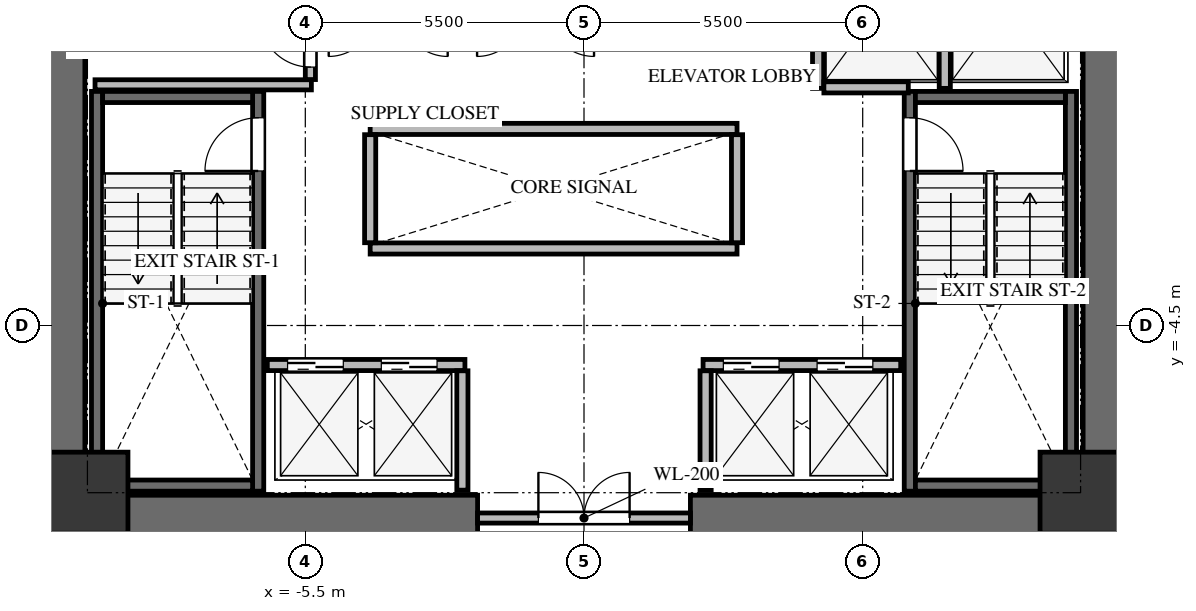
"""IFC4 building model, lengths in metres.
Left out: names, types, materials, properties, quantities, classifications, styles, units other than length and angle.
Written with IfcOpenShell. Run it as: python <this file> out.ifc"""

import sys

from ifc_helpers import new_model, si_unit, direction, frame, frame_2d, origin, origin_2d, place, context, subcontext, project, spatial, rectangle, extrude, source, transform, mapped, element, fill, save


model = new_model("IFC4")
c1 = context("Model", 3, precision=1e-05, world=origin(), true_north=direction((0.0, 1.0)))
c2 = subcontext(c1, "Body", "Model", "MODEL_VIEW")
j1 = project(units=[si_unit("LENGTHUNIT", "METRE"), si_unit("PLANEANGLEUNIT", "RADIAN")], contexts=[c1])
p1 = place(None, origin())
s1 = spatial("IfcSite", under=j1, at=p1, CompositionType="ELEMENT")
p2 = place(p1, origin())
s2 = spatial("IfcBuilding", under=s1, at=p2, CompositionType="ELEMENT")
p3 = place(p2, frame((0.0, 0.0, 68.7)))
s3 = spatial("IfcBuildingStorey", under=s2, at=p3, CompositionType="ELEMENT", Elevation=68.7)
for number, where, z_axis, x_axis in (
    (1, (-10.3, -8.75, 0.0), (0.0, 0.0, 1.0), (0.0, 1.0, 0.0)),
    (2, (10.3, -8.75, 0.0), (0.0, 0.0, 1.0), (0.0, 1.0, 0.0)),
):
    element("IfcWall", number, at=place(p3, frame(where, z_axis=z_axis, x_axis=x_axis)), inside=s3, PredefinedType="SHEAR", context=c2, shape_type="SweptSolid", body=[
        extrude(rectangle(XDim=17.5, YDim=0.9, at=frame_2d((8.75, 0.0))), origin(), (0.0, 0.0, 1.0), 3.3),
    ])
for number, where, z_axis, x_axis in (
    (3, (-9.85, -8.3, 0.0), (0.0, 0.0, 1.0), (1.0, 0.0, 0.0)),
    (4, (2.1, -8.3, 0.0), (0.0, 0.0, 1.0), (1.0, 0.0, 0.0)),
):
    element("IfcWall", number, at=place(p3, frame(where, z_axis=z_axis, x_axis=x_axis)), inside=s3, PredefinedType="SHEAR", context=c2, shape_type="SweptSolid", body=[
        extrude(rectangle(XDim=7.75, YDim=0.9, at=frame_2d((3.875, 0.0))), origin(), (0.0, 0.0, 1.0), 3.3),
    ])
p4 = place(p3, frame((-6.43, -7.77, -0.24), z_axis=(0.0, 0.0, 1.0), x_axis=(0.0, 1.0, 0.0)))
e5 = element("IfcWall", 5, at=p4, inside=s3, PredefinedType="SHEAR", context=c2, shape_type="SweptSolid", body=[
    extrude(rectangle(XDim=7.89, YDim=0.22, at=frame_2d((3.945, 0.0))), origin(), (0.0, 0.0, 1.0), 3.3),
])
p5 = place(p4, frame((6.32, 0.0, 0.0)))
e6 = element("IfcOpeningElement", 6, at=p5, cuts=e5, PredefinedType="OPENING", context=c2, shape_type="SweptSolid", body=[
    extrude(rectangle(XDim=1.05, YDim=2.15, at=frame_2d((0.525, 1.075))), frame((0.0, 0.12, 0.0), z_axis=(0.0, -1.0, 0.0), x_axis=(1.0, 0.0, 0.0)), (0.0, 0.0, 1.0), 0.24),
])
p6 = place(p3, frame((-9.61, 0.12, -0.24), z_axis=(0.0, 0.0, 1.0), x_axis=(0.0, -1.0, 0.0)))
e7 = element("IfcWall", 7, at=p6, inside=s3, PredefinedType="SHEAR", context=c2, shape_type="SweptSolid", body=[
    extrude(rectangle(XDim=7.89, YDim=0.22, at=frame_2d((3.945, 0.0))), origin(), (0.0, 0.0, 1.0), 3.3),
])
for number, where, z_axis, x_axis in (
    (8, (-9.5, -7.66, -0.24), (0.0, 0.0, 1.0), (1.0, 0.0, 0.0)),
    (9, (-6.54, 0.01, -0.24), (0.0, 0.0, 1.0), (-1.0, 0.0, 0.0)),
):
    element("IfcWall", number, at=place(p3, frame(where, z_axis=z_axis, x_axis=x_axis)), inside=s3, PredefinedType="SHEAR", context=c2, shape_type="SweptSolid", body=[
        extrude(rectangle(XDim=2.96, YDim=0.22, at=frame_2d((1.48, 0.0))), origin(), (0.0, 0.0, 1.0), 3.3),
    ])
p7 = place(p3, frame((9.61, -7.77, -0.24), z_axis=(0.0, 0.0, 1.0), x_axis=(0.0, 1.0, 0.0)))
e10 = element("IfcWall", 10, at=p7, inside=s3, PredefinedType="SHEAR", context=c2, shape_type="SweptSolid", body=[
    extrude(rectangle(XDim=7.89, YDim=0.22, at=frame_2d((3.945, 0.0))), origin(), (0.0, 0.0, 1.0), 3.3),
])
p8 = place(p3, frame((6.43, 0.12, -0.24), z_axis=(0.0, 0.0, 1.0), x_axis=(0.0, -1.0, 0.0)))
e11 = element("IfcWall", 11, at=p8, inside=s3, PredefinedType="SHEAR", context=c2, shape_type="SweptSolid", body=[
    extrude(rectangle(XDim=7.89, YDim=0.22, at=frame_2d((3.945, 0.0))), origin(), (0.0, 0.0, 1.0), 3.3),
])
p9 = place(p8, frame((0.52, 0.0, 0.0)))
e12 = element("IfcOpeningElement", 12, at=p9, cuts=e11, PredefinedType="OPENING", context=c2, shape_type="SweptSolid", body=[
    extrude(rectangle(XDim=1.05, YDim=2.15, at=frame_2d((0.525, 1.075))), frame((0.0, 0.12, 0.0), z_axis=(0.0, -1.0, 0.0), x_axis=(1.0, 0.0, 0.0)), (0.0, 0.0, 1.0), 0.24),
])
for number, where, z_axis, x_axis in (
    (13, (6.54, -7.66, -0.24), (0.0, 0.0, 1.0), (1.0, 0.0, 0.0)),
    (14, (9.5, 0.01, -0.24), (0.0, 0.0, 1.0), (-1.0, 0.0, 0.0)),
):
    element("IfcWall", number, at=place(p3, frame(where, z_axis=z_axis, x_axis=x_axis)), inside=s3, PredefinedType="SHEAR", context=c2, shape_type="SweptSolid", body=[
        extrude(rectangle(XDim=2.96, YDim=0.22, at=frame_2d((1.48, 0.0))), origin(), (0.0, 0.0, 1.0), 3.3),
    ])
m1 = source(origin(), c2, "Body", "SweptSolid", [
    extrude(rectangle(XDim=1.6, YDim=1.6, at=origin_2d()), origin(), (0.0, 0.0, 1.0), 3.3),
])
for number, where, z_axis, x_axis in (
    (15, (-9.8, -7.8, -0.24), (0.0, 0.0, 1.0), (1.0, 0.0, 0.0)),
    (16, (9.8, -7.8, -0.24), (0.0, 0.0, 1.0), (1.0, 0.0, 0.0)),
):
    element("IfcColumn", number, at=place(p3, frame(where, z_axis=z_axis, x_axis=x_axis)), inside=s3, PredefinedType="COLUMN", context=c2, shape_type="MappedRepresentation", body=[
        mapped(m1, transform((0.0, 0.0, 0.0), x_axis=(1.0, 0.0, 0.0), y_axis=(0.0, 1.0, 0.0), z_axis=(0.0, 0.0, 1.0), scale=1.0)),
    ])
p10 = place(p3, frame((-2.1, -8.3, 0.0), z_axis=(0.0, 0.0, 1.0), x_axis=(1.0, 0.0, 0.0)))
e17 = element("IfcWall", 17, at=p10, inside=s3, PredefinedType="SOLIDWALL", context=c2, shape_type="SweptSolid", body=[
    extrude(rectangle(XDim=4.2, YDim=0.2, at=frame_2d((2.1, 0.0))), origin(), (0.0, 0.0, 1.0), 3.045),
])
p11 = place(p10, frame((1.2, 0.0, 0.0)))
e18 = element("IfcOpeningElement", 18, at=p11, cuts=e17, PredefinedType="OPENING", context=c2, shape_type="SweptSolid", body=[
    extrude(rectangle(XDim=1.8, YDim=2.15, at=frame_2d((0.9, 1.075))), frame((0.0, 0.11, 0.0), z_axis=(0.0, -1.0, 0.0), x_axis=(1.0, 0.0, 0.0)), (0.0, 0.0, 1.0), 0.22),
])
p12 = place(p3, frame((-9.65, 0.25, 0.0), z_axis=(0.0, 0.0, 1.0), x_axis=(1.0, 0.0, 0.0)))
e19 = element("IfcWall", 19, at=p12, inside=s3, PredefinedType="SOLIDWALL", context=c2, shape_type="SweptSolid", body=[
    extrude(rectangle(XDim=4.27, YDim=0.2, at=frame_2d((2.135, 0.0))), origin(), (0.0, 0.0, 1.0), 3.045),
])
p13 = place(p3, frame((-5.4, 0.354, 0.0), z_axis=(0.0, 0.0, 1.0), x_axis=(0.0, 1.0, 0.0)))
e20 = element("IfcWall", 20, at=p13, inside=s3, PredefinedType="SOLIDWALL", context=c2, shape_type="SweptSolid", body=[
    extrude(rectangle(XDim=4.026, YDim=0.2, at=frame_2d((2.013, 0.0))), origin(), (0.0, 0.0, 1.0), 3.045),
])
p14 = place(p13, frame((0.246, 0.0, 0.0)))
e21 = element("IfcOpeningElement", 21, at=p14, cuts=e20, PredefinedType="OPENING", context=c2, shape_type="SweptSolid", body=[
    extrude(rectangle(XDim=1.0, YDim=2.15, at=frame_2d((0.5, 1.075))), frame((0.0, 0.11, 0.0), z_axis=(0.0, -1.0, 0.0), x_axis=(1.0, 0.0, 0.0)), (0.0, 0.0, 1.0), 0.22),
])
for number, where, z_axis, x_axis in (
    (22, (4.62, 0.18, 0.0), (0.0, 0.0, 1.0), (0.0, 1.0, 0.0)),
    (23, (7.12, 0.18, 0.0), (0.0, 0.0, 1.0), (0.0, 1.0, 0.0)),
):
    element("IfcWall", number, at=place(p3, frame(where, z_axis=z_axis, x_axis=x_axis)), inside=s3, PredefinedType="SOLIDWALL", context=c2, shape_type="SweptSolid", body=[
        extrude(rectangle(XDim=3.186, YDim=0.22, at=frame_2d((1.593, 0.0))), origin(), (0.0, 0.0, 1.0), 3.045),
    ])
p15 = place(p3, frame((4.734, 0.2, 0.0), z_axis=(0.0, 0.0, 1.0), x_axis=(1.0, 0.0, 0.0)))
e24 = element("IfcWall", 24, at=p15, inside=s3, PredefinedType="SOLIDWALL", context=c2, shape_type="SweptSolid", body=[
    extrude(rectangle(XDim=1.666, YDim=0.22, at=frame_2d((0.833, 0.0))), origin(), (0.0, 0.0, 1.0), 3.045),
])
p16 = place(p3, frame((-6.25, -5.28, 0.0), z_axis=(0.0, 0.0, 1.0), x_axis=(1.0, 0.0, 0.0)))
e25 = element("IfcWall", 25, at=p16, inside=s3, PredefinedType="SOLIDWALL", context=c2, shape_type="SweptSolid", body=[
    extrude(rectangle(XDim=3.9, YDim=0.22, at=frame_2d((1.95, 0.0))), origin(), (0.0, 0.0, 1.0), 3.045),
])
p17 = place(p16, frame((0.4, 0.0, 0.0)))
e26 = element("IfcOpeningElement", 26, at=p17, cuts=e25, PredefinedType="OPENING", context=c2, shape_type="SweptSolid", body=[
    extrude(rectangle(XDim=1.1, YDim=2.15, at=frame_2d((0.55, 1.075))), frame((0.0, 0.12, 0.0), z_axis=(0.0, -1.0, 0.0), x_axis=(1.0, 0.0, 0.0)), (0.0, 0.0, 1.0), 0.24),
])
p18 = place(p16, frame((2.25, 0.0, 0.0)))
e27 = element("IfcOpeningElement", 27, at=p18, cuts=e25, PredefinedType="OPENING", context=c2, shape_type="SweptSolid", body=[
    extrude(rectangle(XDim=1.1, YDim=2.15, at=frame_2d((0.55, 1.075))), frame((0.0, 0.12, 0.0), z_axis=(0.0, -1.0, 0.0), x_axis=(1.0, 0.0, 0.0)), (0.0, 0.0, 1.0), 0.24),
])
p19 = place(p3, frame((2.35, -5.28, 0.0), z_axis=(0.0, 0.0, 1.0), x_axis=(1.0, 0.0, 0.0)))
e28 = element("IfcWall", 28, at=p19, inside=s3, PredefinedType="SOLIDWALL", context=c2, shape_type="SweptSolid", body=[
    extrude(rectangle(XDim=3.9, YDim=0.22, at=frame_2d((1.95, 0.0))), origin(), (0.0, 0.0, 1.0), 3.045),
])
p20 = place(p19, frame((0.4, 0.0, 0.0)))
e29 = element("IfcOpeningElement", 29, at=p20, cuts=e28, PredefinedType="OPENING", context=c2, shape_type="SweptSolid", body=[
    extrude(rectangle(XDim=1.1, YDim=2.15, at=frame_2d((0.55, 1.075))), frame((0.0, 0.12, 0.0), z_axis=(0.0, -1.0, 0.0), x_axis=(1.0, 0.0, 0.0)), (0.0, 0.0, 1.0), 0.24),
])
p21 = place(p19, frame((2.25, 0.0, 0.0)))
e30 = element("IfcOpeningElement", 30, at=p21, cuts=e28, PredefinedType="OPENING", context=c2, shape_type="SweptSolid", body=[
    extrude(rectangle(XDim=1.1, YDim=2.15, at=frame_2d((0.55, 1.075))), frame((0.0, 0.12, 0.0), z_axis=(0.0, -1.0, 0.0), x_axis=(1.0, 0.0, 0.0)), (0.0, 0.0, 1.0), 0.24),
])
for number, where, z_axis, x_axis in (
    (31, (-2.4, -7.75, 0.0), (0.0, 0.0, 1.0), (0.0, 1.0, 0.0)),
    (32, (2.4, -7.75, 0.0), (0.0, 0.0, 1.0), (0.0, 1.0, 0.0)),
):
    element("IfcWall", number, at=place(p3, frame(where, z_axis=z_axis, x_axis=x_axis)), inside=s3, PredefinedType="SOLIDWALL", context=c2, shape_type="SweptSolid", body=[
        extrude(rectangle(XDim=2.356, YDim=0.22, at=frame_2d((1.178, 0.0))), origin(), (0.0, 0.0, 1.0), 3.045),
    ])
for number, where, z_axis, x_axis in (
    (33, (-4.22, -2.98, 0.0), (0.0, 0.0, 1.0), (1.0, 0.0, 0.0)),
    (34, (-4.22, -0.62, 0.0), (0.0, 0.0, 1.0), (1.0, 0.0, 0.0)),
):
    element("IfcWall", number, at=place(p3, frame(where, z_axis=z_axis, x_axis=x_axis)), inside=s3, PredefinedType="SOLIDWALL", context=c2, shape_type="SweptSolid", body=[
        extrude(rectangle(XDim=7.24, YDim=0.22, at=frame_2d((3.62, 0.0))), origin(), (0.0, 0.0, 1.0), 3.045),
    ])
for number, where, z_axis, x_axis in (
    (35, (-4.22, -2.866, 0.0), (0.0, 0.0, 1.0), (0.0, 1.0, 0.0)),
    (36, (3.02, -2.866, 0.0), (0.0, 0.0, 1.0), (0.0, 1.0, 0.0)),
):
    element("IfcWall", number, at=place(p3, frame(where, z_axis=z_axis, x_axis=x_axis)), inside=s3, PredefinedType="SOLIDWALL", context=c2, shape_type="SweptSolid", body=[
        extrude(rectangle(XDim=2.132, YDim=0.22, at=frame_2d((1.066, 0.0))), origin(), (0.0, 0.0, 1.0), 3.045),
    ])
m2 = source(origin(), c2, "Body", "SweptSolid", [
    extrude(rectangle(XDim=1.05, YDim=2.15, at=frame_2d((0.525, 1.075))), frame((0.0, 0.025, 0.0), z_axis=(0.0, -1.0, 0.0), x_axis=(1.0, 0.0, 0.0)), (0.0, 0.0, 1.0), 0.05),
])
p22 = place(p5, origin())
e37 = element("IfcDoor", 37, at=p22, inside=s3, OperationType="SINGLE_SWING_LEFT", PredefinedType="DOOR", context=c2, shape_type="MappedRepresentation", body=[
    mapped(m2, transform((0.0, 0.0, 0.0), x_axis=(1.0, 0.0, 0.0), y_axis=(0.0, 1.0, 0.0), z_axis=(0.0, 0.0, 1.0), scale=1.0)),
])
fill(e6, e37)
m3 = source(origin(), c2, "Body", "SweptSolid", [
    extrude(rectangle(XDim=1.05, YDim=2.15, at=frame_2d((0.525, 1.075))), frame((0.0, 0.025, 0.0), z_axis=(0.0, -1.0, 0.0), x_axis=(1.0, 0.0, 0.0)), (0.0, 0.0, 1.0), 0.05),
])
p23 = place(p9, origin())
e38 = element("IfcDoor", 38, at=p23, inside=s3, OperationType="SINGLE_SWING_RIGHT", PredefinedType="DOOR", context=c2, shape_type="MappedRepresentation", body=[
    mapped(m3, transform((0.0, 0.0, 0.0), x_axis=(1.0, 0.0, 0.0), y_axis=(0.0, 1.0, 0.0), z_axis=(0.0, 0.0, 1.0), scale=1.0)),
])
fill(e12, e38)
m4 = source(origin(), c2, "Body", "SweptSolid", [
    extrude(rectangle(XDim=1.8, YDim=2.15, at=frame_2d((0.9, 1.075))), frame((0.0, 0.025, 0.0), z_axis=(0.0, -1.0, 0.0), x_axis=(1.0, 0.0, 0.0)), (0.0, 0.0, 1.0), 0.05),
])
p24 = place(p11, origin())
e39 = element("IfcDoor", 39, at=p24, inside=s3, OperationType="DOUBLE_DOOR_SINGLE_SWING", PredefinedType="DOOR", context=c2, shape_type="MappedRepresentation", body=[
    mapped(m4, transform((0.0, 0.0, 0.0), x_axis=(1.0, 0.0, 0.0), y_axis=(0.0, 1.0, 0.0), z_axis=(0.0, 0.0, 1.0), scale=1.0)),
])
fill(e18, e39)
m5 = source(origin(), c2, "Body", "SweptSolid", [
    extrude(rectangle(XDim=1.0, YDim=2.15, at=frame_2d((0.5, 1.075))), frame((0.0, 0.025, 0.0), z_axis=(0.0, -1.0, 0.0), x_axis=(1.0, 0.0, 0.0)), (0.0, 0.0, 1.0), 0.05),
])
p25 = place(p14, origin())
e40 = element("IfcDoor", 40, at=p25, inside=s3, OperationType="SINGLE_SWING_RIGHT", PredefinedType="DOOR", context=c2, shape_type="MappedRepresentation", body=[
    mapped(m5, transform((0.0, 0.0, 0.0), x_axis=(1.0, 0.0, 0.0), y_axis=(0.0, 1.0, 0.0), z_axis=(0.0, 0.0, 1.0), scale=1.0)),
])
fill(e21, e40)
m6 = source(origin(), c2, "Body", "SweptSolid", [
    extrude(rectangle(XDim=1.1, YDim=2.15, at=frame_2d((0.55, 1.075))), frame((0.0, 0.025, 0.0), z_axis=(0.0, -1.0, 0.0), x_axis=(1.0, 0.0, 0.0)), (0.0, 0.0, 1.0), 0.05),
])
p26 = place(p17, origin())
e41 = element("IfcDoor", 41, at=p26, inside=s3, OperationType="DOUBLE_DOOR_SLIDING", PredefinedType="DOOR", context=c2, shape_type="MappedRepresentation", body=[
    mapped(m6, transform((0.0, 0.0, 0.0), x_axis=(1.0, 0.0, 0.0), y_axis=(0.0, 1.0, 0.0), z_axis=(0.0, 0.0, 1.0), scale=1.0)),
])
fill(e26, e41)
p27 = place(p18, origin())
e42 = element("IfcDoor", 42, at=p27, inside=s3, OperationType="DOUBLE_DOOR_SLIDING", PredefinedType="DOOR", context=c2, shape_type="MappedRepresentation", body=[
    mapped(m6, transform((0.0, 0.0, 0.0), x_axis=(1.0, 0.0, 0.0), y_axis=(0.0, 1.0, 0.0), z_axis=(0.0, 0.0, 1.0), scale=1.0)),
])
fill(e27, e42)
p28 = place(p20, origin())
e43 = element("IfcDoor", 43, at=p28, inside=s3, OperationType="DOUBLE_DOOR_SLIDING", PredefinedType="DOOR", context=c2, shape_type="MappedRepresentation", body=[
    mapped(m6, transform((0.0, 0.0, 0.0), x_axis=(1.0, 0.0, 0.0), y_axis=(0.0, 1.0, 0.0), z_axis=(0.0, 0.0, 1.0), scale=1.0)),
])
fill(e29, e43)
p29 = place(p21, origin())
e44 = element("IfcDoor", 44, at=p29, inside=s3, OperationType="DOUBLE_DOOR_SLIDING", PredefinedType="DOOR", context=c2, shape_type="MappedRepresentation", body=[
    mapped(m6, transform((0.0, 0.0, 0.0), x_axis=(1.0, 0.0, 0.0), y_axis=(0.0, 1.0, 0.0), z_axis=(0.0, 0.0, 1.0), scale=1.0)),
])
fill(e30, e44)
save(model, sys.argv[1])
